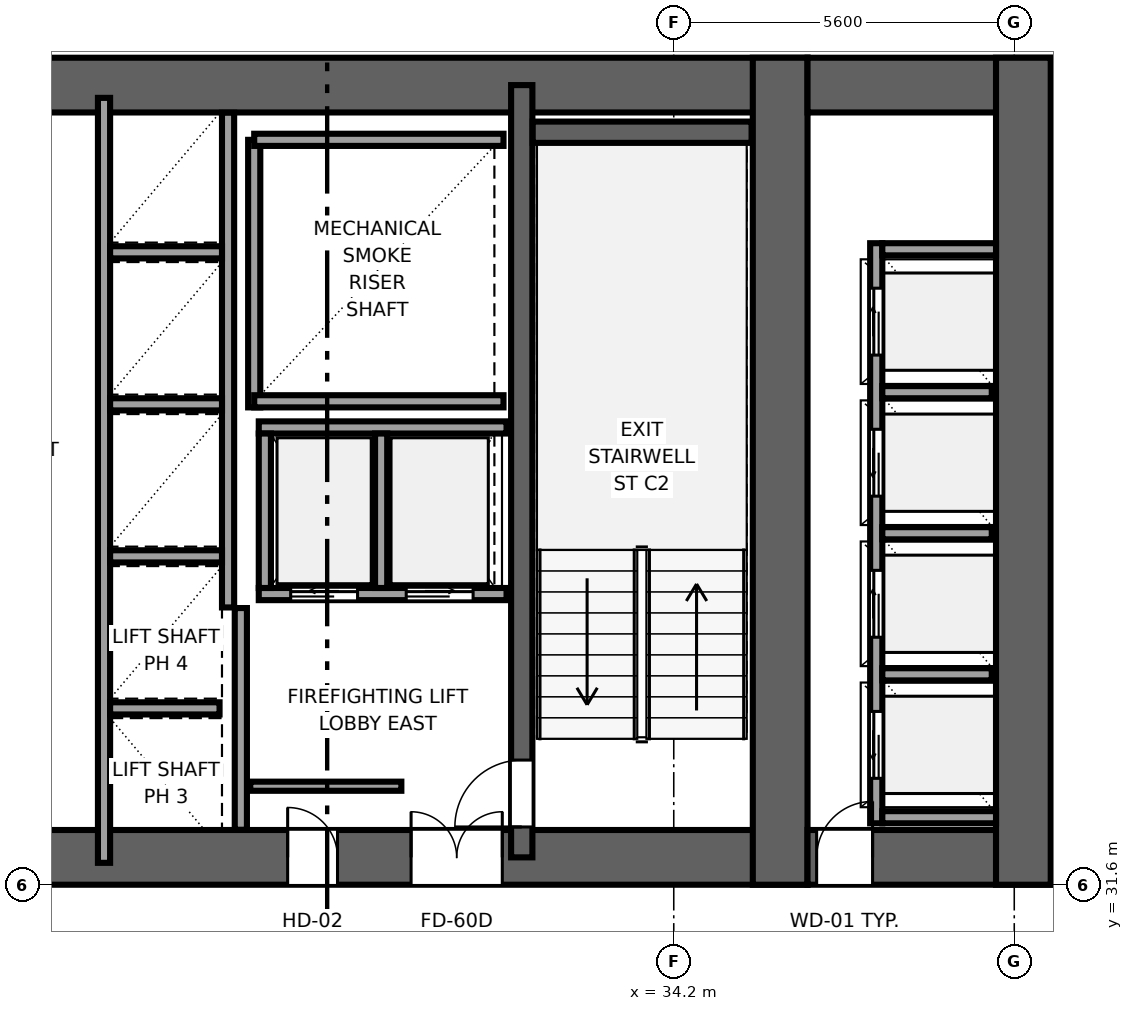
"""IFC4 building model, lengths in metres.
Left out: names, types, materials, properties, quantities, classifications, styles, units other than length and angle.
Written with IfcOpenShell. Run it as: python <this file> out.ifc"""

import sys

from ifc_helpers import new_model, si_unit, direction, frame, frame_2d, origin, place, context, subcontext, project, spatial, rectangle, extrude, source, transform, mapped, element, fill, save


model = new_model("IFC4")
c1 = context("Model", 3, precision=1e-05, world=origin(), true_north=direction((0.0, 1.0)))
c2 = subcontext(c1, "Body", "Model", "MODEL_VIEW")
j1 = project(units=[si_unit("LENGTHUNIT", "METRE"), si_unit("PLANEANGLEUNIT", "RADIAN")], contexts=[c1])
p1 = place(None, origin())
s1 = spatial("IfcSite", under=j1, at=p1, CompositionType="ELEMENT")
p2 = place(p1, origin())
s2 = spatial("IfcBuilding", under=s1, at=p2, CompositionType="ELEMENT")
p3 = place(p2, frame((0.0, 0.0, 60.4)))
s3 = spatial("IfcBuildingStorey", under=s2, at=p3, CompositionType="ELEMENT", Elevation=60.4)
p4 = place(p3, frame((9.6, 32.05, 0.0), z_axis=(0.0, 0.0, 1.0), x_axis=(1.0, 0.0, 0.0)))
e1 = element("IfcWall", 1, at=p4, inside=s3, PredefinedType="SHEAR", context=c2, shape_type="SweptSolid", body=[
    extrude(rectangle(XDim=26.8, YDim=0.9, at=frame_2d((13.4, 0.0))), origin(), (0.0, 0.0, 1.0), 3.55),
])
p5 = place(p4, frame((6.52, 0.0, 0.0), z_axis=(0.0, 0.0, 1.0), x_axis=(-1.0, 0.0, 0.0)))
e2 = element("IfcOpeningElement", 2, at=p5, cuts=e1, PredefinedType="OPENING", context=c2, shape_type="SweptSolid", body=[
    extrude(rectangle(XDim=1.5, YDim=2.04, at=frame_2d((0.75, 1.02))), frame((0.0, 0.46, 0.0), z_axis=(0.0, -1.0, 0.0), x_axis=(1.0, 0.0, 0.0)), (0.0, 0.0, 1.0), 0.92),
])
p6 = place(p4, frame((14.15, 0.0, 0.0), z_axis=(0.0, 0.0, 1.0), x_axis=(-1.0, 0.0, 0.0)))
e3 = element("IfcOpeningElement", 3, at=p6, cuts=e1, PredefinedType="OPENING", context=c2, shape_type="SweptSolid", body=[
    extrude(rectangle(XDim=1.5, YDim=2.04, at=frame_2d((0.75, 1.02))), frame((0.0, 0.46, 0.0), z_axis=(0.0, -1.0, 0.0), x_axis=(1.0, 0.0, 0.0)), (0.0, 0.0, 1.0), 0.92),
])
p7 = place(p4, frame((21.78, 0.0, 0.0), z_axis=(0.0, 0.0, 1.0), x_axis=(-1.0, 0.0, 0.0)))
e4 = element("IfcOpeningElement", 4, at=p7, cuts=e1, PredefinedType="OPENING", context=c2, shape_type="SweptSolid", body=[
    extrude(rectangle(XDim=1.5, YDim=2.04, at=frame_2d((0.75, 1.02))), frame((0.0, 0.46, 0.0), z_axis=(0.0, -1.0, 0.0), x_axis=(1.0, 0.0, 0.0)), (0.0, 0.0, 1.0), 0.92),
])
p8 = place(p4, frame((8.57, 0.0, 0.0), z_axis=(0.0, 0.0, 1.0), x_axis=(-1.0, 0.0, 0.0)))
e5 = element("IfcOpeningElement", 5, at=p8, cuts=e1, PredefinedType="OPENING", context=c2, shape_type="SweptSolid", body=[
    extrude(rectangle(XDim=0.82, YDim=2.01, at=frame_2d((0.41, 1.005))), frame((0.0, 0.46, 0.0), z_axis=(0.0, -1.0, 0.0), x_axis=(1.0, 0.0, 0.0)), (0.0, 0.0, 1.0), 0.92),
])
p9 = place(p4, frame((19.07, 0.0, 0.0), z_axis=(0.0, 0.0, 1.0), x_axis=(-1.0, 0.0, 0.0)))
e6 = element("IfcOpeningElement", 6, at=p9, cuts=e1, PredefinedType="OPENING", context=c2, shape_type="SweptSolid", body=[
    extrude(rectangle(XDim=0.82, YDim=2.01, at=frame_2d((0.41, 1.005))), frame((0.0, 0.46, 0.0), z_axis=(0.0, -1.0, 0.0), x_axis=(1.0, 0.0, 0.0)), (0.0, 0.0, 1.0), 0.92),
])
p10 = place(p3, frame((9.6, 44.75, 0.0), z_axis=(0.0, 0.0, 1.0), x_axis=(1.0, 0.0, 0.0)))
e7 = element("IfcWall", 7, at=p10, inside=s3, PredefinedType="SHEAR", context=c2, shape_type="SweptSolid", body=[
    extrude(rectangle(XDim=26.8, YDim=0.9, at=frame_2d((13.4, 0.0))), origin(), (0.0, 0.0, 1.0), 3.55),
])
p11 = place(p3, frame((35.95, 31.6, 0.0), z_axis=(0.0, 0.0, 1.0), x_axis=(0.0, 1.0, 0.0)))
e8 = element("IfcWall", 8, at=p11, inside=s3, PredefinedType="SHEAR", context=c2, shape_type="SweptSolid", body=[
    extrude(rectangle(XDim=13.6, YDim=0.9, at=frame_2d((6.8, 0.0))), origin(), (0.0, 0.0, 1.0), 3.55),
])
p12 = place(p3, frame((31.7, 32.05, 0.0), z_axis=(0.0, 0.0, 1.0), x_axis=(0.0, 1.0, 0.0)))
e9 = element("IfcWall", 9, at=p12, inside=s3, PredefinedType="SHEAR", context=c2, shape_type="SweptSolid", body=[
    extrude(rectangle(XDim=12.7, YDim=0.35, at=frame_2d((6.35, 0.0))), origin(), (0.0, 0.0, 1.0), 3.55),
])
p13 = place(p12, frame((1.6, 0.0, 0.0), z_axis=(0.0, 0.0, 1.0), x_axis=(-1.0, 0.0, 0.0)))
e10 = element("IfcOpeningElement", 10, at=p13, cuts=e9, PredefinedType="OPENING", context=c2, shape_type="SweptSolid", body=[
    extrude(rectangle(XDim=1.1, YDim=2.12, at=frame_2d((0.55, 1.06))), frame((0.0, 0.185, 0.0), z_axis=(0.0, -1.0, 0.0), x_axis=(1.0, 0.0, 0.0)), (0.0, 0.0, 1.0), 0.37),
])
p14 = place(p3, frame((36.4, 32.05, 0.0), z_axis=(0.0, 0.0, 1.0), x_axis=(1.0, 0.0, 0.0)))
e11 = element("IfcWall", 11, at=p14, inside=s3, PredefinedType="SHEAR", context=c2, shape_type="SweptSolid", body=[
    extrude(rectangle(XDim=4.0, YDim=0.9, at=frame_2d((2.0, 0.0))), origin(), (0.0, 0.0, 1.0), 3.55),
])
p15 = place(p14, frame((1.07, 0.0, 0.0), z_axis=(0.0, 0.0, 1.0), x_axis=(-1.0, 0.0, 0.0)))
e12 = element("IfcOpeningElement", 12, at=p15, cuts=e11, PredefinedType="OPENING", context=c2, shape_type="SweptSolid", body=[
    extrude(rectangle(XDim=0.92, YDim=2.01, at=frame_2d((0.46, 1.005))), frame((0.0, 0.46, 0.0), z_axis=(0.0, -1.0, 0.0), x_axis=(1.0, 0.0, 0.0)), (0.0, 0.0, 1.0), 0.92),
])
p16 = place(p3, frame((36.4, 44.75, 0.0), z_axis=(0.0, 0.0, 1.0), x_axis=(1.0, 0.0, 0.0)))
e13 = element("IfcWall", 13, at=p16, inside=s3, PredefinedType="SHEAR", context=c2, shape_type="SweptSolid", body=[
    extrude(rectangle(XDim=4.0, YDim=0.9, at=frame_2d((2.0, 0.0))), origin(), (0.0, 0.0, 1.0), 3.55),
])
p17 = place(p3, frame((39.95, 31.6, 0.0), z_axis=(0.0, 0.0, 1.0), x_axis=(0.0, 1.0, 0.0)))
e14 = element("IfcWall", 14, at=p17, inside=s3, PredefinedType="SHEAR", context=c2, shape_type="SweptSolid", body=[
    extrude(rectangle(XDim=13.6, YDim=0.9, at=frame_2d((6.8, 0.0))), origin(), (0.0, 0.0, 1.0), 3.55),
])
p18 = place(p3, frame((31.88, 43.975, 0.0), z_axis=(0.0, 0.0, 1.0), x_axis=(1.0, 0.0, 0.0)))
e15 = element("IfcWall", 15, at=p18, inside=s3, PredefinedType="SHEAR", context=c2, shape_type="SweptSolid", body=[
    extrude(rectangle(XDim=3.6, YDim=0.35, at=frame_2d((1.8, 0.0))), origin(), (0.0, 0.0, 1.0), 3.55),
])
p19 = place(p3, frame((27.3, 39.45, 0.0), z_axis=(0.0, 0.0, 1.0), x_axis=(0.0, 1.0, 0.0)))
e16 = element("IfcWall", 16, at=p19, inside=s3, PredefinedType="SOLIDWALL", context=c2, shape_type="SweptSolid", body=[
    extrude(rectangle(XDim=4.4, YDim=0.2, at=frame_2d((2.2, 0.0))), origin(), (0.0, 0.0, 1.0), 3.37),
])
for number, where, z_axis, x_axis in (
    (17, (27.3, 39.55, 0.0), (0.0, 0.0, 1.0), (1.0, 0.0, 0.0)),
    (18, (27.3, 43.85, 0.0), (0.0, 0.0, 1.0), (1.0, 0.0, 0.0)),
):
    element("IfcWall", number, at=place(p3, frame(where, z_axis=z_axis, x_axis=x_axis)), inside=s3, PredefinedType="SOLIDWALL", context=c2, shape_type="SweptSolid", body=[
        extrude(rectangle(XDim=4.1, YDim=0.2, at=frame_2d((2.05, 0.0))), origin(), (0.0, 0.0, 1.0), 3.37),
    ])
p20 = place(p3, frame((27.08, 32.504, 0.0), z_axis=(0.0, 0.0, 1.0), x_axis=(0.0, 1.0, 0.0)))
e19 = element("IfcWall", 19, at=p20, inside=s3, PredefinedType="SOLIDWALL", context=c2, shape_type="SweptSolid", body=[
    extrude(rectangle(XDim=3.646, YDim=0.2, at=frame_2d((1.823, 0.0))), origin(), (0.0, 0.0, 1.0), 3.37),
])
p21 = place(p3, frame((27.375, 36.38, 0.0), z_axis=(0.0, 0.0, 1.0), x_axis=(1.0, 0.0, 0.0)))
e20 = element("IfcWall", 20, at=p21, inside=s3, PredefinedType="SOLIDWALL", context=c2, shape_type="SweptSolid", body=[
    extrude(rectangle(XDim=4.075, YDim=0.2, at=frame_2d((2.038, 0.0))), origin(), (0.0, 0.0, 1.0), 3.37),
])
p22 = place(p21, frame((0.525, 0.0, 0.0)))
e21 = element("IfcOpeningElement", 21, at=p22, cuts=e20, PredefinedType="OPENING", context=c2, shape_type="SweptSolid", body=[
    extrude(rectangle(XDim=1.1, YDim=2.12, at=frame_2d((0.55, 1.06))), frame((0.0, 0.11, 0.0), z_axis=(0.0, -1.0, 0.0), x_axis=(1.0, 0.0, 0.0)), (0.0, 0.0, 1.0), 0.22),
])
p23 = place(p21, frame((2.425, 0.0, 0.0)))
e22 = element("IfcOpeningElement", 22, at=p23, cuts=e20, PredefinedType="OPENING", context=c2, shape_type="SweptSolid", body=[
    extrude(rectangle(XDim=1.1, YDim=2.12, at=frame_2d((0.55, 1.06))), frame((0.0, 0.11, 0.0), z_axis=(0.0, -1.0, 0.0), x_axis=(1.0, 0.0, 0.0)), (0.0, 0.0, 1.0), 0.22),
])
p24 = place(p3, frame((27.375, 39.12, 0.0), z_axis=(0.0, 0.0, 1.0), x_axis=(1.0, 0.0, 0.0)))
e23 = element("IfcWall", 23, at=p24, inside=s3, PredefinedType="SOLIDWALL", context=c2, shape_type="SweptSolid", body=[
    extrude(rectangle(XDim=4.075, YDim=0.2, at=frame_2d((2.038, 0.0))), origin(), (0.0, 0.0, 1.0), 3.37),
])
for number, where, z_axis, x_axis in (
    (24, (27.475, 36.48, 0.0), (0.0, 0.0, 1.0), (0.0, 1.0, 0.0)),
    (25, (29.387, 36.48, 0.0), (0.0, 0.0, 1.0), (0.0, 1.0, 0.0)),
):
    element("IfcWall", number, at=place(p3, frame(where, z_axis=z_axis, x_axis=x_axis)), inside=s3, PredefinedType="SOLIDWALL", context=c2, shape_type="SweptSolid", body=[
        extrude(rectangle(XDim=2.54, YDim=0.2, at=frame_2d((1.27, 0.0))), origin(), (0.0, 0.0, 1.0), 3.37),
    ])
p25 = place(p3, frame((24.83, 31.96, 0.0), z_axis=(0.0, 0.0, 1.0), x_axis=(0.0, 1.0, 0.0)))
e26 = element("IfcWall", 26, at=p25, inside=s3, PredefinedType="SOLIDWALL", context=c2, shape_type="SweptSolid", body=[
    extrude(rectangle(XDim=12.58, YDim=0.2, at=frame_2d((6.29, 0.0))), origin(), (0.0, 0.0, 1.0), 3.37),
])
p26 = place(p3, frame((26.87, 36.16, 0.0), z_axis=(0.0, 0.0, 1.0), x_axis=(0.0, 1.0, 0.0)))
e27 = element("IfcWall", 27, at=p26, inside=s3, PredefinedType="SOLIDWALL", context=c2, shape_type="SweptSolid", body=[
    extrude(rectangle(XDim=8.136, YDim=0.2, at=frame_2d((4.068, 0.0))), origin(), (0.0, 0.0, 1.0), 3.37),
])
p27 = place(p3, frame((24.93, 34.5, 0.0), z_axis=(0.0, 0.0, 1.0), x_axis=(1.0, 0.0, 0.0)))
e28 = element("IfcWall", 28, at=p27, inside=s3, PredefinedType="SOLIDWALL", context=c2, shape_type="SweptSolid", body=[
    extrude(rectangle(XDim=1.8, YDim=0.2, at=frame_2d((0.9, 0.0))), origin(), (0.0, 0.0, 1.0), 3.37),
])
for number, where, z_axis, x_axis in (
    (29, (24.93, 37.0, 0.0), (0.0, 0.0, 1.0), (1.0, 0.0, 0.0)),
    (30, (24.93, 39.5, 0.0), (0.0, 0.0, 1.0), (1.0, 0.0, 0.0)),
    (31, (24.93, 42.0, 0.0), (0.0, 0.0, 1.0), (1.0, 0.0, 0.0)),
):
    element("IfcWall", number, at=place(p3, frame(where, z_axis=z_axis, x_axis=x_axis)), inside=s3, PredefinedType="SOLIDWALL", context=c2, shape_type="SweptSolid", body=[
        extrude(rectangle(XDim=1.84, YDim=0.2, at=frame_2d((0.92, 0.0))), origin(), (0.0, 0.0, 1.0), 3.37),
    ])
p28 = place(p3, frame((37.53, 32.61, 0.0), z_axis=(0.0, 0.0, 1.0), x_axis=(0.0, 1.0, 0.0)))
e32 = element("IfcWall", 32, at=p28, inside=s3, PredefinedType="SOLIDWALL", context=c2, shape_type="SweptSolid", body=[
    extrude(rectangle(XDim=9.54, YDim=0.2, at=frame_2d((4.77, 0.0))), origin(), (0.0, 0.0, 1.0), 3.37),
])
p29 = place(p28, frame((0.74, 0.0, 0.0)))
e33 = element("IfcOpeningElement", 33, at=p29, cuts=e32, PredefinedType="OPENING", context=c2, shape_type="SweptSolid", body=[
    extrude(rectangle(XDim=1.1, YDim=2.12, at=frame_2d((0.55, 1.06))), frame((0.0, 0.11, 0.0), z_axis=(0.0, -1.0, 0.0), x_axis=(1.0, 0.0, 0.0)), (0.0, 0.0, 1.0), 0.22),
])
p30 = place(p28, frame((3.06, 0.0, 0.0)))
e34 = element("IfcOpeningElement", 34, at=p30, cuts=e32, PredefinedType="OPENING", context=c2, shape_type="SweptSolid", body=[
    extrude(rectangle(XDim=1.1, YDim=2.12, at=frame_2d((0.55, 1.06))), frame((0.0, 0.11, 0.0), z_axis=(0.0, -1.0, 0.0), x_axis=(1.0, 0.0, 0.0)), (0.0, 0.0, 1.0), 0.22),
])
p31 = place(p28, frame((5.38, 0.0, 0.0)))
e35 = element("IfcOpeningElement", 35, at=p31, cuts=e32, PredefinedType="OPENING", context=c2, shape_type="SweptSolid", body=[
    extrude(rectangle(XDim=1.1, YDim=2.12, at=frame_2d((0.55, 1.06))), frame((0.0, 0.11, 0.0), z_axis=(0.0, -1.0, 0.0), x_axis=(1.0, 0.0, 0.0)), (0.0, 0.0, 1.0), 0.22),
])
p32 = place(p28, frame((7.7, 0.0, 0.0)))
e36 = element("IfcOpeningElement", 36, at=p32, cuts=e32, PredefinedType="OPENING", context=c2, shape_type="SweptSolid", body=[
    extrude(rectangle(XDim=1.1, YDim=2.12, at=frame_2d((0.55, 1.06))), frame((0.0, 0.11, 0.0), z_axis=(0.0, -1.0, 0.0), x_axis=(1.0, 0.0, 0.0)), (0.0, 0.0, 1.0), 0.22),
])
for number, where, z_axis, x_axis in (
    (37, (37.63, 32.71, 0.0), (0.0, 0.0, 1.0), (1.0, 0.0, 0.0)),
    (38, (37.63, 42.05, 0.0), (0.0, 0.0, 1.0), (1.0, 0.0, 0.0)),
):
    element("IfcWall", number, at=place(p3, frame(where, z_axis=z_axis, x_axis=x_axis)), inside=s3, PredefinedType="SOLIDWALL", context=c2, shape_type="SweptSolid", body=[
        extrude(rectangle(XDim=1.87, YDim=0.2, at=frame_2d((0.935, 0.0))), origin(), (0.0, 0.0, 1.0), 3.37),
    ])
for number, where, z_axis, x_axis in (
    (39, (37.63, 35.06, 0.0), (0.0, 0.0, 1.0), (1.0, 0.0, 0.0)),
    (40, (37.63, 37.38, 0.0), (0.0, 0.0, 1.0), (1.0, 0.0, 0.0)),
    (41, (37.63, 39.7, 0.0), (0.0, 0.0, 1.0), (1.0, 0.0, 0.0)),
):
    element("IfcWall", number, at=place(p3, frame(where, z_axis=z_axis, x_axis=x_axis)), inside=s3, PredefinedType="SOLIDWALL", context=c2, shape_type="SweptSolid", body=[
        extrude(rectangle(XDim=1.8, YDim=0.2, at=frame_2d((0.9, 0.0))), origin(), (0.0, 0.0, 1.0), 3.37),
    ])
p33 = place(p3, frame((27.235, 33.22, 0.0), z_axis=(0.0, 0.0, 1.0), x_axis=(1.0, 0.0, 0.0)))
e42 = element("IfcWall", 42, at=p33, inside=s3, PredefinedType="PARTITIONING", context=c2, shape_type="SweptSolid", body=[
    extrude(rectangle(XDim=2.485, YDim=0.15, at=frame_2d((1.242, 0.0))), origin(), (0.0, 0.0, 1.0), 3.37),
])
m1 = source(origin(), c2, "Body", "SweptSolid", [
    extrude(rectangle(XDim=1.1, YDim=2.12, at=frame_2d((0.55, 1.06))), frame((0.0, 0.025, 0.0), z_axis=(0.0, -1.0, 0.0), x_axis=(1.0, 0.0, 0.0)), (0.0, 0.0, 1.0), 0.05),
])
p34 = place(p13, origin())
e43 = element("IfcDoor", 43, at=p34, inside=s3, OperationType="SINGLE_SWING_LEFT", PredefinedType="DOOR", context=c2, shape_type="MappedRepresentation", body=[
    mapped(m1, transform((0.0, 0.0, 0.0), x_axis=(1.0, 0.0, 0.0), y_axis=(0.0, 1.0, 0.0), z_axis=(0.0, 0.0, 1.0), scale=1.0)),
])
fill(e10, e43)
m2 = source(origin(), c2, "Body", "SweptSolid", [
    extrude(rectangle(XDim=1.5, YDim=2.04, at=frame_2d((0.75, 1.02))), frame((0.0, 0.025, 0.0), z_axis=(0.0, -1.0, 0.0), x_axis=(1.0, 0.0, 0.0)), (0.0, 0.0, 1.0), 0.05),
])
p35 = place(p7, origin())
e44 = element("IfcDoor", 44, at=p35, inside=s3, OperationType="DOUBLE_DOOR_SINGLE_SWING", PredefinedType="DOOR", context=c2, shape_type="MappedRepresentation", body=[
    mapped(m2, transform((0.0, 0.0, 0.0), x_axis=(1.0, 0.0, 0.0), y_axis=(0.0, 1.0, 0.0), z_axis=(0.0, 0.0, 1.0), scale=1.0)),
])
fill(e4, e44)
m3 = source(origin(), c2, "Body", "SweptSolid", [
    extrude(rectangle(XDim=0.82, YDim=2.01, at=frame_2d((0.41, 1.005))), frame((0.0, 0.025, 0.0), z_axis=(0.0, -1.0, 0.0), x_axis=(1.0, 0.0, 0.0)), (0.0, 0.0, 1.0), 0.05),
])
p36 = place(p9, origin())
e45 = element("IfcDoor", 45, at=p36, inside=s3, OperationType="SINGLE_SWING_LEFT", PredefinedType="DOOR", context=c2, shape_type="MappedRepresentation", body=[
    mapped(m3, transform((0.0, 0.0, 0.0), x_axis=(1.0, 0.0, 0.0), y_axis=(0.0, 1.0, 0.0), z_axis=(0.0, 0.0, 1.0), scale=1.0)),
])
fill(e6, e45)
m4 = source(origin(), c2, "Body", "SweptSolid", [
    extrude(rectangle(XDim=0.92, YDim=2.01, at=frame_2d((0.46, 1.005))), frame((0.0, 0.025, 0.0), z_axis=(0.0, -1.0, 0.0), x_axis=(1.0, 0.0, 0.0)), (0.0, 0.0, 1.0), 0.05),
])
p37 = place(p15, origin())
e46 = element("IfcDoor", 46, at=p37, inside=s3, OperationType="SINGLE_SWING_RIGHT", PredefinedType="DOOR", context=c2, shape_type="MappedRepresentation", body=[
    mapped(m4, transform((0.0, 0.0, 0.0), x_axis=(1.0, 0.0, 0.0), y_axis=(0.0, 1.0, 0.0), z_axis=(0.0, 0.0, 1.0), scale=1.0)),
])
fill(e12, e46)
m5 = source(origin(), c2, "Body", "SweptSolid", [
    extrude(rectangle(XDim=1.1, YDim=2.12, at=frame_2d((0.55, 1.06))), frame((0.0, 0.025, 0.0), z_axis=(0.0, -1.0, 0.0), x_axis=(1.0, 0.0, 0.0)), (0.0, 0.0, 1.0), 0.05),
])
p38 = place(p22, origin())
e47 = element("IfcDoor", 47, at=p38, inside=s3, OperationType="SLIDING_TO_LEFT", PredefinedType="DOOR", context=c2, shape_type="MappedRepresentation", body=[
    mapped(m5, transform((0.0, 0.0, 0.0), x_axis=(1.0, 0.0, 0.0), y_axis=(0.0, 1.0, 0.0), z_axis=(0.0, 0.0, 1.0), scale=1.0)),
])
fill(e21, e47)
p39 = place(p23, origin())
e48 = element("IfcDoor", 48, at=p39, inside=s3, OperationType="SLIDING_TO_RIGHT", PredefinedType="DOOR", context=c2, shape_type="MappedRepresentation", body=[
    mapped(m5, transform((0.0, 0.0, 0.0), x_axis=(1.0, 0.0, 0.0), y_axis=(0.0, 1.0, 0.0), z_axis=(0.0, 0.0, 1.0), scale=1.0)),
])
fill(e22, e48)
p40 = place(p29, origin())
e49 = element("IfcDoor", 49, at=p40, inside=s3, OperationType="SLIDING_TO_LEFT", PredefinedType="DOOR", context=c2, shape_type="MappedRepresentation", body=[
    mapped(m5, transform((0.0, 0.0, 0.0), x_axis=(1.0, 0.0, 0.0), y_axis=(0.0, 1.0, 0.0), z_axis=(0.0, 0.0, 1.0), scale=1.0)),
])
fill(e33, e49)
p41 = place(p30, origin())
e50 = element("IfcDoor", 50, at=p41, inside=s3, OperationType="SLIDING_TO_RIGHT", PredefinedType="DOOR", context=c2, shape_type="MappedRepresentation", body=[
    mapped(m5, transform((0.0, 0.0, 0.0), x_axis=(1.0, 0.0, 0.0), y_axis=(0.0, 1.0, 0.0), z_axis=(0.0, 0.0, 1.0), scale=1.0)),
])
fill(e34, e50)
p42 = place(p31, origin())
e51 = element("IfcDoor", 51, at=p42, inside=s3, OperationType="SLIDING_TO_LEFT", PredefinedType="DOOR", context=c2, shape_type="MappedRepresentation", body=[
    mapped(m5, transform((0.0, 0.0, 0.0), x_axis=(1.0, 0.0, 0.0), y_axis=(0.0, 1.0, 0.0), z_axis=(0.0, 0.0, 1.0), scale=1.0)),
])
fill(e35, e51)
p43 = place(p32, origin())
e52 = element("IfcDoor", 52, at=p43, inside=s3, OperationType="SLIDING_TO_RIGHT", PredefinedType="DOOR", context=c2, shape_type="MappedRepresentation", body=[
    mapped(m5, transform((0.0, 0.0, 0.0), x_axis=(1.0, 0.0, 0.0), y_axis=(0.0, 1.0, 0.0), z_axis=(0.0, 0.0, 1.0), scale=1.0)),
])
fill(e36, e52)
save(model, sys.argv[1])
